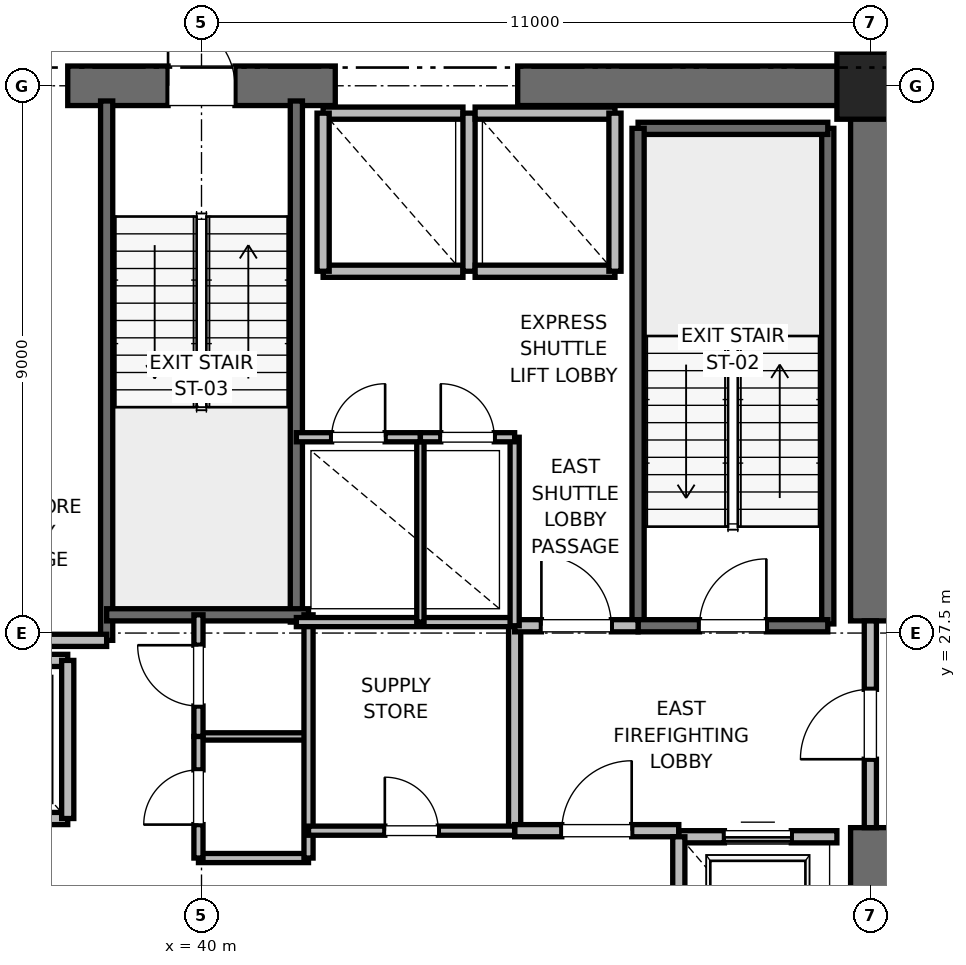
"""IFC4 building model, lengths in metres.
Left out: names, types, materials, properties, quantities, classifications, styles, units other than length and angle.
Written with IfcOpenShell. Run it as: python <this file> out.ifc"""

import sys

from ifc_helpers import new_model, si_unit, direction, frame, frame_2d, origin, origin_2d, place, context, subcontext, project, spatial, rectangle, extrude, element, fill, save


model = new_model("IFC4")
c1 = context("Model", 3, precision=1e-05, world=origin(), true_north=direction((0.0, 1.0)))
c2 = subcontext(c1, "Body", "Model", "MODEL_VIEW")
j1 = project(units=[si_unit("LENGTHUNIT", "METRE"), si_unit("PLANEANGLEUNIT", "RADIAN")], contexts=[c1])
p1 = place(None, origin())
s1 = spatial("IfcSite", under=j1, at=p1, CompositionType="ELEMENT")
p2 = place(p1, origin())
s2 = spatial("IfcBuilding", under=s1, at=p2, CompositionType="ELEMENT")
p3 = place(p2, frame((0.0, 0.0, 75.6)))
s3 = spatial("IfcBuildingStorey", under=s2, at=p3, CompositionType="ELEMENT", Elevation=75.6)
p4 = place(p3, frame((51.0, 36.5, 0.0), z_axis=(0.0, 0.0, 1.0), x_axis=(1.0, 0.0, 0.0)))
e1 = element("IfcColumn", 1, at=p4, inside=s3, PredefinedType="PILASTER", context=c2, shape_type="SweptSolid", body=[
    extrude(rectangle(XDim=1.1, YDim=1.1, at=origin_2d()), origin(), (0.0, 0.0, 1.0), 4.0),
])
p5 = place(p3, frame((37.8, 36.5, 0.0), z_axis=(0.0, 0.0, 1.0), x_axis=(1.0, 0.0, 0.0)))
e2 = element("IfcWall", 2, at=p5, inside=s3, PredefinedType="SHEAR", context=c2, shape_type="SweptSolid", body=[
    extrude(rectangle(XDim=4.4, YDim=0.65, at=frame_2d((2.2, 0.0))), origin(), (0.0, 0.0, 1.0), 3.76),
])
p6 = place(p5, frame((1.65, 0.0, 0.0)))
e3 = element("IfcOpeningElement", 3, at=p6, cuts=e2, PredefinedType="OPENING", context=c2, shape_type="SweptSolid", body=[
    extrude(rectangle(XDim=1.1, YDim=2.15, at=frame_2d((0.55, 1.075))), frame((0.0, 0.325, 0.0), z_axis=(0.0, -1.0, 0.0), x_axis=(1.0, 0.0, 0.0)), (0.0, 0.0, 1.0), 0.65),
])
for number, where, z_axis, x_axis in (
    (4, (45.2, 36.5, 0.0), (0.0, 0.0, 1.0), (1.0, 0.0, 0.0)),
    (5, (51.0, 18.5, 0.0), (0.0, 0.0, 1.0), (0.0, 1.0, 0.0)),
):
    element("IfcWall", number, at=place(p3, frame(where, z_axis=z_axis, x_axis=x_axis)), inside=s3, PredefinedType="SHEAR", context=c2, shape_type="SweptSolid", body=[
        extrude(rectangle(XDim=5.8, YDim=0.65, at=frame_2d((2.9, 0.0))), origin(), (0.0, 0.0, 1.0), 3.76),
    ])
p7 = place(p3, frame((51.0, 27.7, 0.0), z_axis=(0.0, 0.0, 1.0), x_axis=(0.0, 1.0, 0.0)))
e6 = element("IfcWall", 6, at=p7, inside=s3, PredefinedType="SHEAR", context=c2, shape_type="SweptSolid", body=[
    extrude(rectangle(XDim=8.8, YDim=0.65, at=frame_2d((4.4, 0.0))), origin(), (0.0, 0.0, 1.0), 3.76),
])
p8 = place(p3, frame((50.3, 27.65, 0.0), z_axis=(0.0, 0.0, 1.0), x_axis=(0.0, 1.0, 0.0)))
e7 = element("IfcWall", 7, at=p8, inside=s3, PredefinedType="SOLIDWALL", context=c2, shape_type="SweptSolid", body=[
    extrude(rectangle(XDim=8.15, YDim=0.2, at=frame_2d((4.075, 0.0))), origin(), (0.0, 0.0, 1.0), 3.76),
])
p9 = place(p3, frame((47.18, 35.8, 0.0), z_axis=(0.0, 0.0, 1.0), x_axis=(1.0, 0.0, 0.0)))
e8 = element("IfcWall", 8, at=p9, inside=s3, PredefinedType="SOLIDWALL", context=c2, shape_type="SweptSolid", body=[
    extrude(rectangle(XDim=3.12, YDim=0.2, at=frame_2d((1.56, 0.0))), origin(), (0.0, 0.0, 1.0), 3.76),
])
p10 = place(p3, frame((47.18, 27.62, 0.0), z_axis=(0.0, 0.0, 1.0), x_axis=(0.0, 1.0, 0.0)))
e9 = element("IfcWall", 9, at=p10, inside=s3, PredefinedType="SOLIDWALL", context=c2, shape_type="SweptSolid", body=[
    extrude(rectangle(XDim=8.18, YDim=0.2, at=frame_2d((4.09, 0.0))), origin(), (0.0, 0.0, 1.0), 3.76),
])
p11 = place(p3, frame((47.18, 27.62, 0.0), z_axis=(0.0, 0.0, 1.0), x_axis=(1.0, 0.0, 0.0)))
e10 = element("IfcWall", 10, at=p11, inside=s3, PredefinedType="SOLIDWALL", context=c2, shape_type="SweptSolid", body=[
    extrude(rectangle(XDim=3.12, YDim=0.2, at=frame_2d((1.56, 0.0))), origin(), (0.0, 0.0, 1.0), 3.76),
])
p12 = place(p11, frame((1.01, 0.0, 0.0)))
e11 = element("IfcOpeningElement", 11, at=p12, cuts=e10, PredefinedType="OPENING", context=c2, shape_type="SweptSolid", body=[
    extrude(rectangle(XDim=1.1, YDim=2.15, at=frame_2d((0.55, 1.075))), frame((0.0, 0.1, 0.0), z_axis=(0.0, -1.0, 0.0), x_axis=(1.0, 0.0, 0.0)), (0.0, 0.0, 1.0), 0.2),
])
p13 = place(p3, frame((38.44, 27.38, 0.0), z_axis=(0.0, 0.0, 1.0), x_axis=(0.0, 1.0, 0.0)))
e12 = element("IfcWall", 12, at=p13, inside=s3, PredefinedType="SOLIDWALL", context=c2, shape_type="SweptSolid", body=[
    extrude(rectangle(XDim=8.87, YDim=0.2, at=frame_2d((4.435, 0.0))), origin(), (0.0, 0.0, 1.0), 3.76),
])
p14 = place(p3, frame((41.56, 27.68, 0.0), z_axis=(0.0, 0.0, 1.0), x_axis=(0.0, 1.0, 0.0)))
e13 = element("IfcWall", 13, at=p14, inside=s3, PredefinedType="SOLIDWALL", context=c2, shape_type="SweptSolid", body=[
    extrude(rectangle(XDim=8.57, YDim=0.2, at=frame_2d((4.285, 0.0))), origin(), (0.0, 0.0, 1.0), 3.76),
])
p15 = place(p3, frame((38.44, 27.8, 0.0), z_axis=(0.0, 0.0, 1.0), x_axis=(1.0, 0.0, 0.0)))
e14 = element("IfcWall", 14, at=p15, inside=s3, PredefinedType="SOLIDWALL", context=c2, shape_type="SweptSolid", body=[
    extrude(rectangle(XDim=3.32, YDim=0.2, at=frame_2d((1.66, 0.0))), origin(), (0.0, 0.0, 1.0), 3.76),
])
p16 = place(p3, frame((32.82, 27.38, 0.0), z_axis=(0.0, 0.0, 1.0), x_axis=(1.0, 0.0, 0.0)))
e15 = element("IfcWall", 15, at=p16, inside=s3, PredefinedType="PARTITIONING", context=c2, shape_type="SweptSolid", body=[
    extrude(rectangle(XDim=5.62, YDim=0.2, at=frame_2d((2.81, 0.0))), origin(), (0.0, 0.0, 1.0), 3.76),
])
p17 = place(p3, frame((45.15, 24.25, 0.0), z_axis=(0.0, 0.0, 1.0), x_axis=(0.0, 1.0, 0.0)))
e16 = element("IfcWall", 16, at=p17, inside=s3, PredefinedType="PARTITIONING", context=c2, shape_type="SweptSolid", body=[
    extrude(rectangle(XDim=3.37, YDim=0.2, at=frame_2d((1.685, 0.0))), origin(), (0.0, 0.0, 1.0), 3.76),
])
p18 = place(p3, frame((45.15, 24.25, 0.0), z_axis=(0.0, 0.0, 1.0), x_axis=(1.0, 0.0, 0.0)))
e17 = element("IfcWall", 17, at=p18, inside=s3, PredefinedType="PARTITIONING", context=c2, shape_type="SweptSolid", body=[
    extrude(rectangle(XDim=2.7, YDim=0.2, at=frame_2d((1.35, 0.0))), origin(), (0.0, 0.0, 1.0), 3.76),
])
p19 = place(p18, frame((0.775, 0.0, 0.0)))
e18 = element("IfcOpeningElement", 18, at=p19, cuts=e17, PredefinedType="OPENING", context=c2, shape_type="SweptSolid", body=[
    extrude(rectangle(XDim=1.15, YDim=2.2, at=frame_2d((0.575, 1.1))), frame((0.0, 0.1, 0.0), z_axis=(0.0, -1.0, 0.0), x_axis=(1.0, 0.0, 0.0)), (0.0, 0.0, 1.0), 0.2),
])
p20 = place(p3, frame((45.15, 27.62, 0.0), z_axis=(0.0, 0.0, 1.0), x_axis=(1.0, 0.0, 0.0)))
e19 = element("IfcWall", 19, at=p20, inside=s3, PredefinedType="PARTITIONING", context=c2, shape_type="SweptSolid", body=[
    extrude(rectangle(XDim=2.03, YDim=0.2, at=frame_2d((1.015, 0.0))), origin(), (0.0, 0.0, 1.0), 3.76),
])
p21 = place(p20, frame((0.44, 0.0, 0.0)))
e20 = element("IfcOpeningElement", 20, at=p21, cuts=e19, PredefinedType="OPENING", context=c2, shape_type="SweptSolid", body=[
    extrude(rectangle(XDim=1.15, YDim=2.2, at=frame_2d((0.575, 1.1))), frame((0.0, 0.1, 0.0), z_axis=(0.0, -1.0, 0.0), x_axis=(1.0, 0.0, 0.0)), (0.0, 0.0, 1.0), 0.2),
])
p22 = place(p3, frame((51.0, 24.3, 0.0), z_axis=(0.0, 0.0, 1.0), x_axis=(0.0, 1.0, 0.0)))
e21 = element("IfcWall", 21, at=p22, inside=s3, PredefinedType="PARTITIONING", context=c2, shape_type="SweptSolid", body=[
    extrude(rectangle(XDim=3.4, YDim=0.2, at=frame_2d((1.7, 0.0))), origin(), (0.0, 0.0, 1.0), 2.54),
])
p23 = place(p22, frame((1.125, 0.0, 0.0)))
e22 = element("IfcOpeningElement", 22, at=p23, cuts=e21, PredefinedType="OPENING", context=c2, shape_type="SweptSolid", body=[
    extrude(rectangle(XDim=1.15, YDim=2.2, at=frame_2d((0.575, 1.1))), frame((0.0, 0.1, 0.0), z_axis=(0.0, -1.0, 0.0), x_axis=(1.0, 0.0, 0.0)), (0.0, 0.0, 1.0), 0.2),
])
p24 = place(p3, frame((50.45, 24.15, 0.0), z_axis=(0.0, 0.0, 1.0), x_axis=(-1.0, 0.0, 0.0)))
e23 = element("IfcWall", 23, at=p24, inside=s3, PredefinedType="SOLIDWALL", context=c2, shape_type="SweptSolid", body=[
    extrude(rectangle(XDim=2.6, YDim=0.2, at=frame_2d((1.3, 0.0))), origin(), (0.0, 0.0, 1.0), 2.54),
])
p25 = place(p24, frame((0.75, 0.0, 0.0)))
e24 = element("IfcOpeningElement", 24, at=p25, cuts=e23, PredefinedType="OPENING", context=c2, shape_type="SweptSolid", body=[
    extrude(rectangle(XDim=1.1, YDim=2.2, at=frame_2d((0.55, 1.1))), frame((0.0, 0.1, 0.0), z_axis=(0.0, -1.0, 0.0), x_axis=(1.0, 0.0, 0.0)), (0.0, 0.0, 1.0), 0.2),
])
p26 = place(p3, frame((47.85, 24.15, 0.0), z_axis=(0.0, 0.0, 1.0), x_axis=(0.0, -1.0, 0.0)))
e25 = element("IfcWall", 25, at=p26, inside=s3, PredefinedType="SOLIDWALL", context=c2, shape_type="SweptSolid", body=[
    extrude(rectangle(XDim=3.0, YDim=0.2, at=frame_2d((1.5, 0.0))), origin(), (0.0, 0.0, 1.0), 3.76),
])
p27 = place(p3, frame((35.5, 24.45, 0.0), z_axis=(0.0, 0.0, 1.0), x_axis=(1.0, 0.0, 0.0)))
e26 = element("IfcWall", 26, at=p27, inside=s3, PredefinedType="SOLIDWALL", context=c2, shape_type="SweptSolid", body=[
    extrude(rectangle(XDim=2.3, YDim=0.2, at=frame_2d((1.15, 0.0))), origin(), (0.0, 0.0, 1.0), 3.76),
])
p28 = place(p27, frame((0.6, 0.0, 0.0)))
e27 = element("IfcOpeningElement", 27, at=p28, cuts=e26, PredefinedType="OPENING", context=c2, shape_type="SweptSolid", body=[
    extrude(rectangle(XDim=1.1, YDim=2.2, at=frame_2d((0.55, 1.1))), frame((0.0, 0.1, 0.0), z_axis=(0.0, -1.0, 0.0), x_axis=(1.0, 0.0, 0.0)), (0.0, 0.0, 1.0), 0.2),
])
p29 = place(p3, frame((37.8, 27.05, 0.0), z_axis=(0.0, 0.0, 1.0), x_axis=(-1.0, 0.0, 0.0)))
e28 = element("IfcWall", 28, at=p29, inside=s3, PredefinedType="SOLIDWALL", context=c2, shape_type="SweptSolid", body=[
    extrude(rectangle(XDim=2.3, YDim=0.2, at=frame_2d((1.15, 0.0))), origin(), (0.0, 0.0, 1.0), 3.76),
])
p30 = place(p3, frame((37.8, 24.45, 0.0), z_axis=(0.0, 0.0, 1.0), x_axis=(0.0, 1.0, 0.0)))
e29 = element("IfcWall", 29, at=p30, inside=s3, PredefinedType="SOLIDWALL", context=c2, shape_type="SweptSolid", body=[
    extrude(rectangle(XDim=2.6, YDim=0.2, at=frame_2d((1.3, 0.0))), origin(), (0.0, 0.0, 1.0), 3.76),
])
p31 = place(p3, frame((42.0, 33.45, 0.0), z_axis=(0.0, 0.0, 1.0), x_axis=(1.0, 0.0, 0.0)))
e30 = element("IfcWall", 30, at=p31, inside=s3, PredefinedType="SOLIDWALL", context=c2, shape_type="SweptSolid", body=[
    extrude(rectangle(XDim=2.3, YDim=0.2, at=frame_2d((1.15, 0.0))), origin(), (0.0, 0.0, 1.0), 3.76),
])
p32 = place(p3, frame((44.3, 36.05, 0.0), z_axis=(0.0, 0.0, 1.0), x_axis=(-1.0, 0.0, 0.0)))
e31 = element("IfcWall", 31, at=p32, inside=s3, PredefinedType="SOLIDWALL", context=c2, shape_type="SweptSolid", body=[
    extrude(rectangle(XDim=2.3, YDim=0.2, at=frame_2d((1.15, 0.0))), origin(), (0.0, 0.0, 1.0), 2.54),
])
for number, where, z_axis, x_axis in (
    (32, (42.0, 36.05, 0.0), (0.0, 0.0, 1.0), (0.0, -1.0, 0.0)),
    (33, (44.4, 33.45, 0.0), (0.0, 0.0, 1.0), (0.0, 1.0, 0.0)),
):
    element("IfcWall", number, at=place(p3, frame(where, z_axis=z_axis, x_axis=x_axis)), inside=s3, PredefinedType="SOLIDWALL", context=c2, shape_type="SweptSolid", body=[
        extrude(rectangle(XDim=2.6, YDim=0.2, at=frame_2d((1.3, 0.0))), origin(), (0.0, 0.0, 1.0), 2.54),
    ])
p33 = place(p3, frame((44.5, 33.45, 0.0), z_axis=(0.0, 0.0, 1.0), x_axis=(1.0, 0.0, 0.0)))
e34 = element("IfcWall", 34, at=p33, inside=s3, PredefinedType="SOLIDWALL", context=c2, shape_type="SweptSolid", body=[
    extrude(rectangle(XDim=2.3, YDim=0.2, at=frame_2d((1.15, 0.0))), origin(), (0.0, 0.0, 1.0), 3.76),
])
p34 = place(p3, frame((46.8, 36.05, 0.0), z_axis=(0.0, 0.0, 1.0), x_axis=(-1.0, 0.0, 0.0)))
e35 = element("IfcWall", 35, at=p34, inside=s3, PredefinedType="SOLIDWALL", context=c2, shape_type="SweptSolid", body=[
    extrude(rectangle(XDim=2.3, YDim=0.2, at=frame_2d((1.15, 0.0))), origin(), (0.0, 0.0, 1.0), 2.54),
])
p35 = place(p3, frame((46.8, 33.45, 0.0), z_axis=(0.0, 0.0, 1.0), x_axis=(0.0, 1.0, 0.0)))
e36 = element("IfcWall", 36, at=p35, inside=s3, PredefinedType="SOLIDWALL", context=c2, shape_type="SweptSolid", body=[
    extrude(rectangle(XDim=2.6, YDim=0.2, at=frame_2d((1.3, 0.0))), origin(), (0.0, 0.0, 1.0), 3.76),
])
p36 = place(p3, frame((39.95, 23.8, 0.0), z_axis=(0.0, 0.0, 1.0), x_axis=(1.0, 0.0, 0.0)))
e37 = element("IfcWall", 37, at=p36, inside=s3, PredefinedType="PARTITIONING", context=c2, shape_type="SweptSolid", body=[
    extrude(rectangle(XDim=1.81, YDim=0.15, at=frame_2d((0.905, 0.0))), origin(), (0.0, 0.0, 1.0), 2.85),
])
p37 = place(p3, frame((39.95, 25.8, 0.0), z_axis=(0.0, 0.0, 1.0), x_axis=(1.0, 0.0, 0.0)))
e38 = element("IfcWall", 38, at=p37, inside=s3, PredefinedType="PARTITIONING", context=c2, shape_type="SweptSolid", body=[
    extrude(rectangle(XDim=1.81, YDim=0.12, at=frame_2d((0.905, 0.0))), origin(), (0.0, 0.0, 1.0), 2.85),
])
p38 = place(p3, frame((41.76, 23.8, 0.0), z_axis=(0.0, 0.0, 1.0), x_axis=(0.0, 1.0, 0.0)))
e39 = element("IfcWall", 39, at=p38, inside=s3, PredefinedType="PARTITIONING", context=c2, shape_type="SweptSolid", body=[
    extrude(rectangle(XDim=4.0, YDim=0.15, at=frame_2d((2.0, 0.0))), origin(), (0.0, 0.0, 1.0), 2.85),
])
p39 = place(p3, frame((39.95, 23.8, 0.0), z_axis=(0.0, 0.0, 1.0), x_axis=(0.0, 1.0, 0.0)))
e40 = element("IfcWall", 40, at=p39, inside=s3, PredefinedType="PARTITIONING", context=c2, shape_type="SweptSolid", body=[
    extrude(rectangle(XDim=2.0, YDim=0.15, at=frame_2d((1.0, 0.0))), origin(), (0.0, 0.0, 1.0), 2.85),
])
p40 = place(p39, frame((0.55, 0.0, 0.0)))
e41 = element("IfcOpeningElement", 41, at=p40, cuts=e40, PredefinedType="OPENING", context=c2, shape_type="SweptSolid", body=[
    extrude(rectangle(XDim=0.9, YDim=2.1, at=frame_2d((0.45, 1.05))), frame((0.0, 0.075, 0.0), z_axis=(0.0, -1.0, 0.0), x_axis=(1.0, 0.0, 0.0)), (0.0, 0.0, 1.0), 0.15),
])
p41 = place(p3, frame((39.95, 25.8, 0.0), z_axis=(0.0, 0.0, 1.0), x_axis=(0.0, 1.0, 0.0)))
e42 = element("IfcWall", 42, at=p41, inside=s3, PredefinedType="PARTITIONING", context=c2, shape_type="SweptSolid", body=[
    extrude(rectangle(XDim=2.0, YDim=0.15, at=frame_2d((1.0, 0.0))), origin(), (0.0, 0.0, 1.0), 2.85),
])
p42 = place(p41, frame((0.5, 0.0, 0.0)))
e43 = element("IfcOpeningElement", 43, at=p42, cuts=e42, PredefinedType="OPENING", context=c2, shape_type="SweptSolid", body=[
    extrude(rectangle(XDim=1.0, YDim=2.15, at=frame_2d((0.5, 1.075))), frame((0.0, 0.075, 0.0), z_axis=(0.0, -1.0, 0.0), x_axis=(1.0, 0.0, 0.0)), (0.0, 0.0, 1.0), 0.15),
])
p43 = place(p3, frame((41.56, 27.68, 0.0), z_axis=(0.0, 0.0, 1.0), x_axis=(1.0, 0.0, 0.0)))
e44 = element("IfcWall", 44, at=p43, inside=s3, PredefinedType="PARTITIONING", context=c2, shape_type="SweptSolid", body=[
    extrude(rectangle(XDim=3.59, YDim=0.15, at=frame_2d((1.795, 0.0))), origin(), (0.0, 0.0, 1.0), 2.85),
])
p44 = place(p3, frame((41.76, 24.25, 0.0), z_axis=(0.0, 0.0, 1.0), x_axis=(1.0, 0.0, 0.0)))
e45 = element("IfcWall", 45, at=p44, inside=s3, PredefinedType="PARTITIONING", context=c2, shape_type="SweptSolid", body=[
    extrude(rectangle(XDim=3.39, YDim=0.15, at=frame_2d((1.695, 0.0))), origin(), (0.0, 0.0, 1.0), 2.85),
])
p45 = place(p44, frame((1.255, 0.0, 0.0)))
e46 = element("IfcOpeningElement", 46, at=p45, cuts=e45, PredefinedType="OPENING", context=c2, shape_type="SweptSolid", body=[
    extrude(rectangle(XDim=0.88, YDim=2.1, at=frame_2d((0.44, 1.05))), frame((0.0, 0.075, 0.0), z_axis=(0.0, -1.0, 0.0), x_axis=(1.0, 0.0, 0.0)), (0.0, 0.0, 1.0), 0.15),
])
p46 = place(p3, frame((45.15, 27.62, 0.0), z_axis=(0.0, 0.0, 1.0), x_axis=(0.0, 1.0, 0.0)))
e47 = element("IfcWall", 47, at=p46, inside=s3, PredefinedType="PARTITIONING", context=c2, shape_type="SweptSolid", body=[
    extrude(rectangle(XDim=3.1, YDim=0.15, at=frame_2d((1.55, 0.0))), origin(), (0.0, 0.0, 1.0), 2.85),
])
p47 = place(p3, frame((43.6, 27.68, 0.0), z_axis=(0.0, 0.0, 1.0), x_axis=(0.0, 1.0, 0.0)))
e48 = element("IfcWall", 48, at=p47, inside=s3, PredefinedType="PARTITIONING", context=c2, shape_type="SweptSolid", body=[
    extrude(rectangle(XDim=3.04, YDim=0.12, at=frame_2d((1.52, 0.0))), origin(), (0.0, 0.0, 1.0), 2.85),
])
p48 = place(p3, frame((41.56, 30.72, 0.0), z_axis=(0.0, 0.0, 1.0), x_axis=(1.0, 0.0, 0.0)))
e49 = element("IfcWall", 49, at=p48, inside=s3, PredefinedType="PARTITIONING", context=c2, shape_type="SweptSolid", body=[
    extrude(rectangle(XDim=2.04, YDim=0.15, at=frame_2d((1.02, 0.0))), origin(), (0.0, 0.0, 1.0), 2.85),
])
p49 = place(p48, frame((0.58, 0.0, 0.0)))
e50 = element("IfcOpeningElement", 50, at=p49, cuts=e49, PredefinedType="OPENING", context=c2, shape_type="SweptSolid", body=[
    extrude(rectangle(XDim=0.88, YDim=2.1, at=frame_2d((0.44, 1.05))), frame((0.0, 0.075, 0.0), z_axis=(0.0, -1.0, 0.0), x_axis=(1.0, 0.0, 0.0)), (0.0, 0.0, 1.0), 0.15),
])
p50 = place(p3, frame((43.6, 30.72, 0.0), z_axis=(0.0, 0.0, 1.0), x_axis=(1.0, 0.0, 0.0)))
e51 = element("IfcWall", 51, at=p50, inside=s3, PredefinedType="PARTITIONING", context=c2, shape_type="SweptSolid", body=[
    extrude(rectangle(XDim=1.55, YDim=0.15, at=frame_2d((0.775, 0.0))), origin(), (0.0, 0.0, 1.0), 2.85),
])
p51 = place(p50, frame((0.335, 0.0, 0.0)))
e52 = element("IfcOpeningElement", 52, at=p51, cuts=e51, PredefinedType="OPENING", context=c2, shape_type="SweptSolid", body=[
    extrude(rectangle(XDim=0.88, YDim=2.1, at=frame_2d((0.44, 1.05))), frame((0.0, 0.075, 0.0), z_axis=(0.0, -1.0, 0.0), x_axis=(1.0, 0.0, 0.0)), (0.0, 0.0, 1.0), 0.15),
])
p52 = place(p12, origin())
e53 = element("IfcDoor", 53, at=p52, inside=s3, OperationType="SINGLE_SWING_RIGHT", PredefinedType="DOOR", context=c2, shape_type="SweptSolid", body=[
    extrude(rectangle(XDim=1.1, YDim=2.15, at=frame_2d((0.55, 1.075))), frame((0.0, 0.025, 0.0), z_axis=(0.0, -1.0, 0.0), x_axis=(1.0, 0.0, 0.0)), (0.0, 0.0, 1.0), 0.05),
])
fill(e11, e53)
p53 = place(p6, origin())
e54 = element("IfcDoor", 54, at=p53, inside=s3, OperationType="SINGLE_SWING_LEFT", PredefinedType="DOOR", context=c2, shape_type="SweptSolid", body=[
    extrude(rectangle(XDim=1.1, YDim=2.15, at=frame_2d((0.55, 1.075))), frame((0.0, 0.025, 0.0), z_axis=(0.0, -1.0, 0.0), x_axis=(1.0, 0.0, 0.0)), (0.0, 0.0, 1.0), 0.05),
])
fill(e3, e54)
p54 = place(p19, origin())
e55 = element("IfcDoor", 55, at=p54, inside=s3, OperationType="SINGLE_SWING_RIGHT", PredefinedType="DOOR", context=c2, shape_type="SweptSolid", body=[
    extrude(rectangle(XDim=1.15, YDim=2.2, at=frame_2d((0.575, 1.1))), frame((0.0, 0.025, 0.0), z_axis=(0.0, -1.0, 0.0), x_axis=(1.0, 0.0, 0.0)), (0.0, 0.0, 1.0), 0.05),
])
fill(e18, e55)
p55 = place(p21, origin())
e56 = element("IfcDoor", 56, at=p55, inside=s3, OperationType="SINGLE_SWING_LEFT", PredefinedType="DOOR", context=c2, shape_type="SweptSolid", body=[
    extrude(rectangle(XDim=1.15, YDim=2.2, at=frame_2d((0.575, 1.1))), frame((0.0, 0.025, 0.0), z_axis=(0.0, -1.0, 0.0), x_axis=(1.0, 0.0, 0.0)), (0.0, 0.0, 1.0), 0.05),
])
fill(e20, e56)
p56 = place(p23, origin())
e57 = element("IfcDoor", 57, at=p56, inside=s3, OperationType="SINGLE_SWING_LEFT", PredefinedType="DOOR", context=c2, shape_type="SweptSolid", body=[
    extrude(rectangle(XDim=1.15, YDim=2.2, at=frame_2d((0.575, 1.1))), frame((0.0, 0.025, 0.0), z_axis=(0.0, -1.0, 0.0), x_axis=(1.0, 0.0, 0.0)), (0.0, 0.0, 1.0), 0.05),
])
fill(e22, e57)
p57 = place(p25, origin())
e58 = element("IfcDoor", 58, at=p57, inside=s3, OperationType="SLIDING_TO_RIGHT", PredefinedType="DOOR", context=c2, shape_type="SweptSolid", body=[
    extrude(rectangle(XDim=1.1, YDim=2.2, at=frame_2d((0.55, 1.1))), frame((0.0, 0.025, 0.0), z_axis=(0.0, -1.0, 0.0), x_axis=(1.0, 0.0, 0.0)), (0.0, 0.0, 1.0), 0.05),
])
fill(e24, e58)
p58 = place(p40, origin())
e59 = element("IfcDoor", 59, at=p58, inside=s3, OperationType="SINGLE_SWING_LEFT", PredefinedType="DOOR", context=c2, shape_type="SweptSolid", body=[
    extrude(rectangle(XDim=0.9, YDim=2.1, at=frame_2d((0.45, 1.05))), frame((0.0, 0.025, 0.0), z_axis=(0.0, -1.0, 0.0), x_axis=(1.0, 0.0, 0.0)), (0.0, 0.0, 1.0), 0.05),
])
fill(e41, e59)
p59 = place(p42, origin())
e60 = element("IfcDoor", 60, at=p59, inside=s3, OperationType="SINGLE_SWING_RIGHT", PredefinedType="DOOR", context=c2, shape_type="SweptSolid", body=[
    extrude(rectangle(XDim=1.0, YDim=2.15, at=frame_2d((0.5, 1.075))), frame((0.0, 0.025, 0.0), z_axis=(0.0, -1.0, 0.0), x_axis=(1.0, 0.0, 0.0)), (0.0, 0.0, 1.0), 0.05),
])
fill(e43, e60)
p60 = place(p45, origin())
e61 = element("IfcDoor", 61, at=p60, inside=s3, OperationType="SINGLE_SWING_LEFT", PredefinedType="DOOR", context=c2, shape_type="SweptSolid", body=[
    extrude(rectangle(XDim=0.88, YDim=2.1, at=frame_2d((0.44, 1.05))), frame((0.0, 0.025, 0.0), z_axis=(0.0, -1.0, 0.0), x_axis=(1.0, 0.0, 0.0)), (0.0, 0.0, 1.0), 0.05),
])
fill(e46, e61)
p61 = place(p49, origin())
e62 = element("IfcDoor", 62, at=p61, inside=s3, OperationType="SINGLE_SWING_RIGHT", PredefinedType="DOOR", context=c2, shape_type="SweptSolid", body=[
    extrude(rectangle(XDim=0.88, YDim=2.1, at=frame_2d((0.44, 1.05))), frame((0.0, 0.025, 0.0), z_axis=(0.0, -1.0, 0.0), x_axis=(1.0, 0.0, 0.0)), (0.0, 0.0, 1.0), 0.05),
])
fill(e50, e62)
p62 = place(p51, origin())
e63 = element("IfcDoor", 63, at=p62, inside=s3, OperationType="SINGLE_SWING_LEFT", PredefinedType="DOOR", context=c2, shape_type="SweptSolid", body=[
    extrude(rectangle(XDim=0.88, YDim=2.1, at=frame_2d((0.44, 1.05))), frame((0.0, 0.025, 0.0), z_axis=(0.0, -1.0, 0.0), x_axis=(1.0, 0.0, 0.0)), (0.0, 0.0, 1.0), 0.05),
])
fill(e52, e63)
save(model, sys.argv[1])
